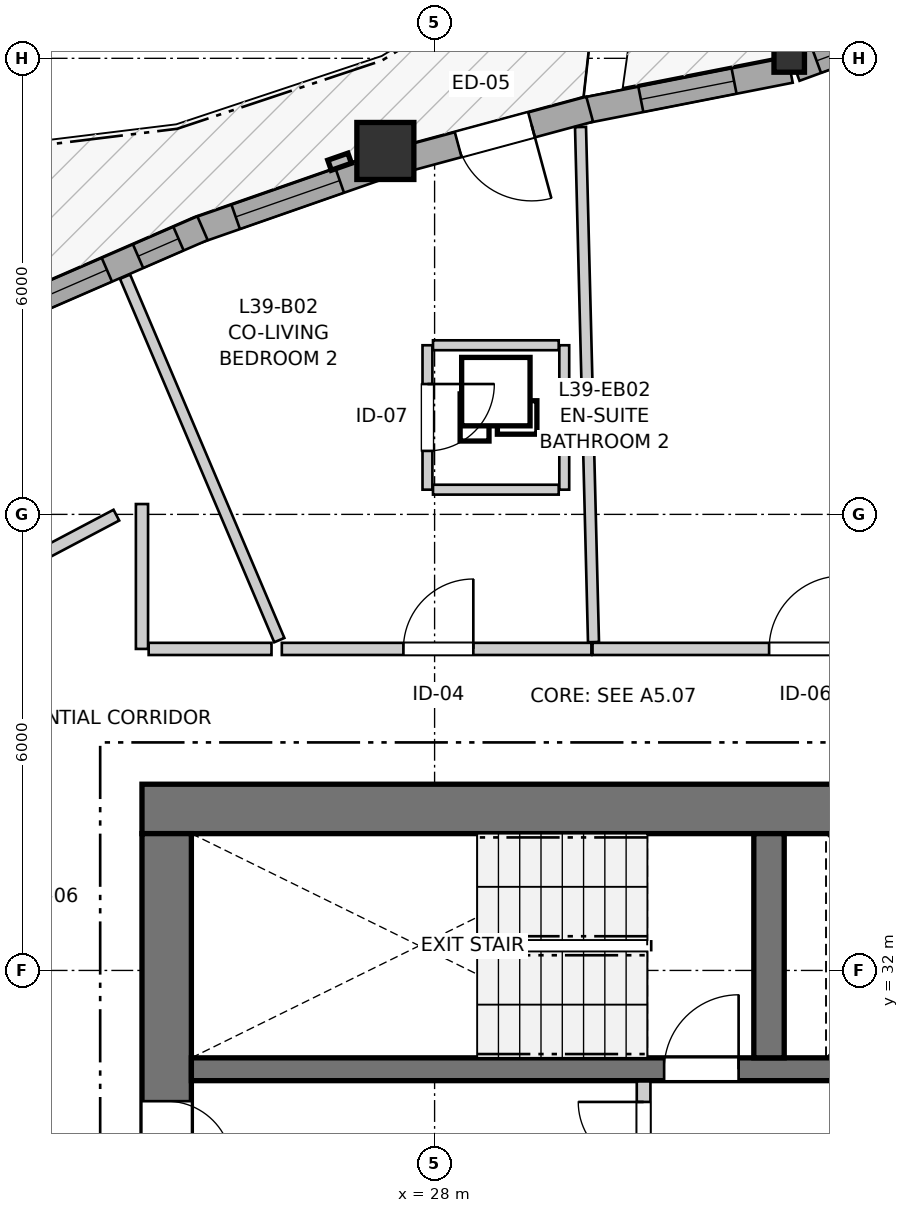
"""IFC4 building model, lengths in metres.
Left out: names, types, materials, properties, quantities, classifications, styles, units other than length and angle.
Written with IfcOpenShell. Run it as: python <this file> out.ifc"""

import sys

from ifc_helpers import new_model, si_unit, direction, frame, frame_2d, origin, origin_2d, place, context, subcontext, project, spatial, rectangle, i_section, extrude, source, transform, mapped, element, fill, save


model = new_model("IFC4")
c1 = context("Model", 3, precision=1e-05, world=origin(), true_north=direction((0.0, 1.0)))
c2 = subcontext(c1, "Body", "Model", "MODEL_VIEW")
j1 = project(units=[si_unit("LENGTHUNIT", "METRE"), si_unit("PLANEANGLEUNIT", "RADIAN")], contexts=[c1])
p1 = place(None, origin())
s1 = spatial("IfcSite", under=j1, at=p1, CompositionType="ELEMENT")
p2 = place(p1, origin())
s2 = spatial("IfcBuilding", under=s1, at=p2, CompositionType="ELEMENT")
p3 = place(p2, frame((0.0, 0.0, 133.0)))
s3 = spatial("IfcBuildingStorey", under=s2, at=p3, CompositionType="ELEMENT", Elevation=133.0)
p4 = place(p3, frame((36.55, 34.125, 0.0), z_axis=(0.0, 0.0, 1.0), x_axis=(-1.0, 0.0, 0.0)))
e1 = element("IfcWall", 1, at=p4, inside=s3, PredefinedType="SHEAR", context=c2, shape_type="SweptSolid", body=[
    extrude(rectangle(XDim=12.4, YDim=0.65, at=frame_2d((6.2, 0.0))), origin(), (0.0, 0.0, 1.0), 2.95),
])
p5 = place(p3, frame((24.475, 33.8, 0.0), z_axis=(0.0, 0.0, 1.0), x_axis=(0.0, -1.0, 0.0)))
e2 = element("IfcWall", 2, at=p5, inside=s3, PredefinedType="SHEAR", context=c2, shape_type="SweptSolid", body=[
    extrude(rectangle(XDim=15.6, YDim=0.65, at=frame_2d((7.8, 0.0))), origin(), (0.0, 0.0, 1.0), 2.95),
])
p6 = place(p5, frame((7.05, 0.0, 0.0)))
e3 = element("IfcOpeningElement", 3, at=p6, cuts=e2, PredefinedType="OPENING", context=c2, shape_type="SweptSolid", body=[
    extrude(rectangle(XDim=1.5, YDim=2.15, at=frame_2d((0.75, 1.075))), frame((0.0, 0.335, 0.0), z_axis=(0.0, -1.0, 0.0), x_axis=(1.0, 0.0, 0.0)), (0.0, 0.0, 1.0), 0.67),
])
p7 = place(p5, frame((3.52, 0.0, 0.0)))
e4 = element("IfcOpeningElement", 4, at=p7, cuts=e2, PredefinedType="OPENING", context=c2, shape_type="SweptSolid", body=[
    extrude(rectangle(XDim=0.86, YDim=2.05, at=frame_2d((0.43, 1.025))), frame((0.0, 0.335, 0.0), z_axis=(0.0, -1.0, 0.0), x_axis=(1.0, 0.0, 0.0)), (0.0, 0.0, 1.0), 0.67),
])
p8 = place(p5, frame((11.22, 0.0, 0.0)))
e5 = element("IfcOpeningElement", 5, at=p8, cuts=e2, PredefinedType="OPENING", context=c2, shape_type="SweptSolid", body=[
    extrude(rectangle(XDim=0.86, YDim=2.05, at=frame_2d((0.43, 1.025))), frame((0.0, 0.335, 0.0), z_axis=(0.0, -1.0, 0.0), x_axis=(1.0, 0.0, 0.0)), (0.0, 0.0, 1.0), 0.67),
])
p9 = place(p3, frame((24.8, 30.7, 0.0), z_axis=(0.0, 0.0, 1.0), x_axis=(1.0, 0.0, 0.0)))
e6 = element("IfcWall", 6, at=p9, inside=s3, PredefinedType="SHEAR", context=c2, shape_type="SweptSolid", body=[
    extrude(rectangle(XDim=11.1, YDim=0.3, at=frame_2d((5.55, 0.0))), origin(), (0.0, 0.0, 1.0), 2.95),
])
p10 = place(p9, frame((6.22, 0.0, 0.0)))
e7 = element("IfcOpeningElement", 7, at=p10, cuts=e6, PredefinedType="OPENING", context=c2, shape_type="SweptSolid", body=[
    extrude(rectangle(XDim=0.98, YDim=2.15, at=frame_2d((0.49, 1.075))), frame((0.0, 0.16, 0.0), z_axis=(0.0, -1.0, 0.0), x_axis=(1.0, 0.0, 0.0)), (0.0, 0.0, 1.0), 0.32),
])
p11 = place(p9, frame((9.15, 0.0, 0.0)))
e8 = element("IfcOpeningElement", 8, at=p11, cuts=e6, PredefinedType="OPENING", context=c2, shape_type="SweptSolid", body=[
    extrude(rectangle(XDim=1.15, YDim=2.15, at=frame_2d((0.575, 1.075))), frame((0.0, 0.16, 0.0), z_axis=(0.0, -1.0, 0.0), x_axis=(1.0, 0.0, 0.0)), (0.0, 0.0, 1.0), 0.32),
])
p12 = place(p3, frame((32.4, 30.85, 0.0), z_axis=(0.0, 0.0, 1.0), x_axis=(0.0, 1.0, 0.0)))
e9 = element("IfcWall", 9, at=p12, inside=s3, PredefinedType="SHEAR", context=c2, shape_type="SweptSolid", body=[
    extrude(rectangle(XDim=2.95, YDim=0.4, at=frame_2d((1.475, 0.0))), origin(), (0.0, 0.0, 1.0), 2.95),
])
m1 = source(origin(), c2, "Body", "SweptSolid", [
    extrude(i_section(OverallWidth=0.401, OverallDepth=0.399, WebThickness=0.023, FlangeThickness=0.036, FilletRadius=0.015, at=origin_2d()), origin(), (0.0, 0.0, 1.0), 2.95),
])
p13 = place(p3, frame((32.666, 44.017, 0.0), z_axis=(0.0, 0.0, 1.0), x_axis=(1.0, 0.0, 0.0)))
e10 = element("IfcColumn", 10, at=p13, inside=s3, PredefinedType="PILASTER", context=c2, shape_type="MappedRepresentation", body=[
    mapped(m1, transform((0.0, 0.0, 0.0), x_axis=(1.0, 0.0, 0.0), y_axis=(0.0, 1.0, 0.0), z_axis=(0.0, 0.0, 1.0), scale=1.0)),
])
m2 = source(origin(), c2, "Body", "SweptSolid", [
    extrude(rectangle(XDim=0.75, YDim=0.75, at=origin_2d()), origin(), (0.0, 0.0, 1.0), 2.95),
])
p14 = place(p3, frame((27.352, 42.781, 0.0), z_axis=(0.0, 0.0, 1.0), x_axis=(1.0, 0.0, 0.0)))
e11 = element("IfcColumn", 11, at=p14, inside=s3, PredefinedType="COLUMN", context=c2, shape_type="MappedRepresentation", body=[
    mapped(m2, transform((0.0, 0.0, 0.0), x_axis=(1.0, 0.0, 0.0), y_axis=(0.0, 1.0, 0.0), z_axis=(0.0, 0.0, 1.0), scale=1.0)),
])
p15 = place(p3, frame((34.644, 44.557, 0.0), z_axis=(0.0, 0.0, 1.0), x_axis=(-0.939440593615, -0.342711790092, 0.0)))
e12 = element("IfcWall", 12, at=p15, inside=s3, PredefinedType="SOLIDWALL", context=c2, shape_type="SweptSolid", body=[
    extrude(rectangle(XDim=2.023, YDim=0.34, at=frame_2d((1.012, 0.0))), origin(), (0.0, 0.0, 1.0), 2.53),
])
p16 = place(p15, frame((0.322, 0.0, 0.82)))
e13 = element("IfcOpeningElement", 13, at=p16, cuts=e12, PredefinedType="OPENING", context=c2, shape_type="SweptSolid", body=[
    extrude(rectangle(XDim=1.4, YDim=1.35, at=frame_2d((0.7, 0.675))), frame((0.0, 0.18, 0.0), z_axis=(0.0, -1.0, 0.0), x_axis=(1.0, 0.0, 0.0)), (0.0, 0.0, 1.0), 0.36),
])
p17 = place(p3, frame((32.679, 43.846, 0.0), z_axis=(0.0, 0.0, 1.0), x_axis=(-0.981247929568, -0.192749839736, 0.0)))
e14 = element("IfcWall", 14, at=p17, inside=s3, PredefinedType="SOLIDWALL", context=c2, shape_type="SweptSolid", body=[
    extrude(rectangle(XDim=2.776, YDim=0.34, at=frame_2d((1.388, 0.0))), origin(), (0.0, 0.0, 1.0), 2.53),
])
p18 = place(p17, frame((0.753, 0.0, 0.82)))
e15 = element("IfcOpeningElement", 15, at=p18, cuts=e14, PredefinedType="OPENING", context=c2, shape_type="SweptSolid", body=[
    extrude(rectangle(XDim=1.25, YDim=1.35, at=frame_2d((0.625, 0.675))), frame((0.0, 0.18, 0.0), z_axis=(0.0, -1.0, 0.0), x_axis=(1.0, 0.0, 0.0)), (0.0, 0.0, 1.0), 0.36),
])
p19 = place(p3, frame((30.04, 43.331, 0.0), z_axis=(0.0, 0.0, 1.0), x_axis=(-0.965460468502, -0.260549580233, 0.0)))
e16 = element("IfcWall", 16, at=p19, inside=s3, PredefinedType="SOLIDWALL", context=c2, shape_type="SweptSolid", body=[
    extrude(rectangle(XDim=2.583, YDim=0.34, at=frame_2d((1.292, 0.0))), origin(), (0.0, 0.0, 1.0), 2.53),
])
p20 = place(p19, frame((0.792, 0.0, 0.0)))
e17 = element("IfcOpeningElement", 17, at=p20, cuts=e16, PredefinedType="OPENING", context=c2, shape_type="SweptSolid", body=[
    extrude(rectangle(XDim=1.0, YDim=2.1, at=frame_2d((0.5, 1.05))), frame((0.0, 0.18, 0.0), z_axis=(0.0, -1.0, 0.0), x_axis=(1.0, 0.0, 0.0)), (0.0, 0.0, 1.0), 0.36),
])
p21 = place(p3, frame((27.262, 42.57, 0.0), z_axis=(0.0, 0.0, 1.0), x_axis=(-0.944148723561, -0.329519631884, 0.0)))
e18 = element("IfcWall", 18, at=p21, inside=s3, PredefinedType="SOLIDWALL", context=c2, shape_type="SweptSolid", body=[
    extrude(rectangle(XDim=2.54, YDim=0.34, at=frame_2d((1.27, 0.0))), origin(), (0.0, 0.0, 1.0), 2.53),
])
p22 = place(p21, frame((0.54, 0.0, 0.82)))
e19 = element("IfcOpeningElement", 19, at=p22, cuts=e18, PredefinedType="OPENING", context=c2, shape_type="SweptSolid", body=[
    extrude(rectangle(XDim=1.45, YDim=1.25, at=frame_2d((0.725, 0.625))), frame((0.0, 0.18, 0.0), z_axis=(0.0, -1.0, 0.0), x_axis=(1.0, 0.0, 0.0)), (0.0, 0.0, 1.0), 0.36),
])
p23 = place(p3, frame((24.947, 41.765, 0.0), z_axis=(0.0, 0.0, 1.0), x_axis=(-0.917074459221, -0.398715984435, 0.0)))
e20 = element("IfcWall", 20, at=p23, inside=s3, PredefinedType="SOLIDWALL", context=c2, shape_type="SweptSolid", body=[
    extrude(rectangle(XDim=2.645, YDim=0.34, at=frame_2d((1.322, 0.0))), origin(), (0.0, 0.0, 1.0), 2.53),
])
p24 = place(p23, frame((0.344, 0.0, 0.82)))
e21 = element("IfcOpeningElement", 21, at=p24, cuts=e20, PredefinedType="OPENING", context=c2, shape_type="SweptSolid", body=[
    extrude(rectangle(XDim=0.58, YDim=1.35, at=frame_2d((0.29, 0.675))), frame((0.0, 0.18, 0.0), z_axis=(0.0, -1.0, 0.0), x_axis=(1.0, 0.0, 0.0)), (0.0, 0.0, 1.0), 0.36),
])
p25 = place(p23, frame((1.372, 0.0, 0.82)))
e22 = element("IfcOpeningElement", 22, at=p25, cuts=e20, PredefinedType="OPENING", context=c2, shape_type="SweptSolid", body=[
    extrude(rectangle(XDim=0.95, YDim=1.35, at=frame_2d((0.475, 0.675))), frame((0.0, 0.18, 0.0), z_axis=(0.0, -1.0, 0.0), x_axis=(1.0, 0.0, 0.0)), (0.0, 0.0, 1.0), 0.36),
])
p26 = place(p3, frame((30.75, 27.43, 0.0), z_axis=(0.0, 0.0, 1.0), x_axis=(0.0, 1.0, 0.0)))
e23 = element("IfcWall", 23, at=p26, inside=s3, PredefinedType="PARTITIONING", context=c2, shape_type="SweptSolid", body=[
    extrude(rectangle(XDim=3.11, YDim=0.18, at=frame_2d((1.555, 0.0))), origin(), (0.0, 0.0, 1.0), 2.95),
])
p27 = place(p26, frame((1.98, 0.0, 0.0)))
e24 = element("IfcOpeningElement", 24, at=p27, cuts=e23, PredefinedType="OPENING", context=c2, shape_type="SweptSolid", body=[
    extrude(rectangle(XDim=0.86, YDim=2.05, at=frame_2d((0.43, 1.025))), frame((0.0, 0.1, 0.0), z_axis=(0.0, -1.0, 0.0), x_axis=(1.0, 0.0, 0.0)), (0.0, 0.0, 1.0), 0.2),
])
p28 = place(p3, frame((30.078, 36.23, 0.0), z_axis=(0.0, 0.0, 1.0), x_axis=(1.0, 0.0, 0.0)))
e25 = element("IfcWall", 25, at=p28, inside=s3, PredefinedType="PARTITIONING", context=c2, shape_type="SweptSolid", body=[
    extrude(rectangle(XDim=5.608, YDim=0.16, at=frame_2d((2.804, 0.0))), origin(), (0.0, 0.0, 1.0), 2.588),
])
p29 = place(p28, frame((2.323, 0.0, 0.0)))
e26 = element("IfcOpeningElement", 26, at=p29, cuts=e25, PredefinedType="OPENING", context=c2, shape_type="SweptSolid", body=[
    extrude(rectangle(XDim=0.96, YDim=2.1, at=frame_2d((0.48, 1.05))), frame((0.0, 0.09, 0.0), z_axis=(0.0, -1.0, 0.0), x_axis=(1.0, 0.0, 0.0)), (0.0, 0.0, 1.0), 0.18),
])
p30 = place(p3, frame((25.99, 36.23, 0.0), z_axis=(0.0, 0.0, 1.0), x_axis=(1.0, 0.0, 0.0)))
e27 = element("IfcWall", 27, at=p30, inside=s3, PredefinedType="PARTITIONING", context=c2, shape_type="SweptSolid", body=[
    extrude(rectangle(XDim=4.073, YDim=0.16, at=frame_2d((2.037, 0.0))), origin(), (0.0, 0.0, 1.0), 2.95),
])
p31 = place(p30, frame((1.6, 0.0, 0.0)))
e28 = element("IfcOpeningElement", 28, at=p31, cuts=e27, PredefinedType="OPENING", context=c2, shape_type="SweptSolid", body=[
    extrude(rectangle(XDim=0.92, YDim=2.1, at=frame_2d((0.46, 1.05))), frame((0.0, 0.09, 0.0), z_axis=(0.0, -1.0, 0.0), x_axis=(1.0, 0.0, 0.0)), (0.0, 0.0, 1.0), 0.18),
])
p32 = place(p3, frame((27.906, 40.225, 0.0), z_axis=(0.0, 0.0, 1.0), x_axis=(0.0, -1.0, 0.0)))
e29 = element("IfcWall", 29, at=p32, inside=s3, PredefinedType="PARTITIONING", context=c2, shape_type="SweptSolid", body=[
    extrude(rectangle(XDim=1.9, YDim=0.13, at=frame_2d((0.95, 0.0))), origin(), (0.0, 0.0, 1.0), 2.318),
])
p33 = place(p32, frame((0.51, 0.0, 0.0)))
e30 = element("IfcOpeningElement", 30, at=p33, cuts=e29, PredefinedType="OPENING", context=c2, shape_type="SweptSolid", body=[
    extrude(rectangle(XDim=0.88, YDim=2.05, at=frame_2d((0.44, 1.025))), frame((0.0, 0.075, 0.0), z_axis=(0.0, -1.0, 0.0), x_axis=(1.0, 0.0, 0.0)), (0.0, 0.0, 1.0), 0.15),
])
p34 = place(p3, frame((29.92, 43.096, 0.0), z_axis=(0.0, 0.0, 1.0), x_axis=(0.025211755772, -0.999682133166, 0.0)))
e31 = element("IfcWall", 31, at=p34, inside=s3, PredefinedType="PARTITIONING", context=c2, shape_type="SweptSolid", body=[
    extrude(rectangle(XDim=6.779, YDim=0.145, at=frame_2d((3.389, 0.0))), origin(), (0.0, 0.0, 1.0), 2.95),
])
p35 = place(p3, frame((23.927, 41.127, 0.0), z_axis=(0.0, 0.0, 1.0), x_axis=(0.39073452171, -0.920503413108, 0.0)))
e32 = element("IfcWall", 32, at=p35, inside=s3, PredefinedType="PARTITIONING", context=c2, shape_type="SweptSolid", body=[
    extrude(rectangle(XDim=5.194, YDim=0.145, at=frame_2d((2.597, 0.0))), origin(), (0.0, 0.0, 1.0), 2.95),
])
p36 = place(p3, frame((24.15, 36.23, 0.0), z_axis=(0.0, 0.0, 1.0), x_axis=(0.0, 1.0, 0.0)))
e33 = element("IfcWall", 33, at=p36, inside=s3, PredefinedType="PARTITIONING", context=c2, shape_type="SweptSolid", body=[
    extrude(rectangle(XDim=1.906, YDim=0.16, at=frame_2d((0.953, 0.0))), origin(), (0.0, 0.0, 1.0), 2.95),
])
p37 = place(p3, frame((29.706, 38.325, 0.0), z_axis=(0.0, 0.0, 1.0), x_axis=(0.0, 1.0, 0.0)))
e34 = element("IfcWall", 34, at=p37, inside=s3, PredefinedType="PARTITIONING", context=c2, shape_type="SweptSolid", body=[
    extrude(rectangle(XDim=1.9, YDim=0.13, at=frame_2d((0.95, 0.0))), origin(), (0.0, 0.0, 1.0), 2.95),
])
p38 = place(p3, frame((24.238, 36.23, 0.0), z_axis=(0.0, 0.0, 1.0), x_axis=(1.0, 0.0, 0.0)))
e35 = element("IfcWall", 35, at=p38, inside=s3, PredefinedType="PARTITIONING", context=c2, shape_type="SweptSolid", body=[
    extrude(rectangle(XDim=1.616, YDim=0.16, at=frame_2d((0.808, 0.0))), origin(), (0.0, 0.0, 1.0), 2.95),
])
p39 = place(p3, frame((27.979, 40.225, 0.0), z_axis=(0.0, 0.0, 1.0), x_axis=(1.0, 0.0, 0.0)))
e36 = element("IfcWall", 36, at=p39, inside=s3, PredefinedType="PARTITIONING", context=c2, shape_type="SweptSolid", body=[
    extrude(rectangle(XDim=1.654, YDim=0.13, at=frame_2d((0.827, 0.0))), origin(), (0.0, 0.0, 1.0), 2.558),
])
p40 = place(p3, frame((27.979, 38.325, 0.0), z_axis=(0.0, 0.0, 1.0), x_axis=(1.0, 0.0, 0.0)))
e37 = element("IfcWall", 37, at=p40, inside=s3, PredefinedType="PARTITIONING", context=c2, shape_type="SweptSolid", body=[
    extrude(rectangle(XDim=1.654, YDim=0.13, at=frame_2d((0.827, 0.0))), origin(), (0.0, 0.0, 1.0), 2.95),
])
p41 = place(p3, frame((22.37, 37.228, 0.0), z_axis=(0.0, 0.0, 1.0), x_axis=(0.884271493782, 0.466973152638, 0.0)))
e38 = element("IfcWall", 38, at=p41, inside=s3, PredefinedType="PARTITIONING", context=c2, shape_type="SweptSolid", body=[
    extrude(rectangle(XDim=1.632, YDim=0.16, at=frame_2d((0.816, 0.0))), origin(), (0.0, 0.0, 1.0), 2.558),
])
m3 = source(origin(), c2, "Body", "SweptSolid", [
    extrude(rectangle(XDim=1.4, YDim=1.35, at=frame_2d((0.7, 0.675))), frame((0.0, 0.03, 0.0), z_axis=(0.0, -1.0, 0.0), x_axis=(1.0, 0.0, 0.0)), (0.0, 0.0, 1.0), 0.06),
])
p42 = place(p16, origin())
e39 = element("IfcWindow", 39, at=p42, inside=s3, PartitioningType="SINGLE_PANEL", PredefinedType="WINDOW", context=c2, shape_type="MappedRepresentation", body=[
    mapped(m3, transform((0.0, 0.0, 0.0), x_axis=(1.0, 0.0, 0.0), y_axis=(0.0, 1.0, 0.0), z_axis=(0.0, 0.0, 1.0), scale=1.0)),
])
fill(e13, e39)
m4 = source(origin(), c2, "Body", "SweptSolid", [
    extrude(rectangle(XDim=1.25, YDim=1.35, at=frame_2d((0.625, 0.675))), frame((0.0, 0.03, 0.0), z_axis=(0.0, -1.0, 0.0), x_axis=(1.0, 0.0, 0.0)), (0.0, 0.0, 1.0), 0.06),
])
p43 = place(p18, origin())
e40 = element("IfcWindow", 40, at=p43, inside=s3, PartitioningType="SINGLE_PANEL", PredefinedType="WINDOW", context=c2, shape_type="MappedRepresentation", body=[
    mapped(m4, transform((0.0, 0.0, 0.0), x_axis=(1.0, 0.0, 0.0), y_axis=(0.0, 1.0, 0.0), z_axis=(0.0, 0.0, 1.0), scale=1.0)),
])
fill(e15, e40)
m5 = source(origin(), c2, "Body", "SweptSolid", [
    extrude(rectangle(XDim=1.45, YDim=1.25, at=frame_2d((0.725, 0.625))), frame((0.0, 0.03, 0.0), z_axis=(0.0, -1.0, 0.0), x_axis=(1.0, 0.0, 0.0)), (0.0, 0.0, 1.0), 0.06),
])
p44 = place(p22, origin())
e41 = element("IfcWindow", 41, at=p44, inside=s3, PartitioningType="SINGLE_PANEL", PredefinedType="WINDOW", context=c2, shape_type="MappedRepresentation", body=[
    mapped(m5, transform((0.0, 0.0, 0.0), x_axis=(1.0, 0.0, 0.0), y_axis=(0.0, 1.0, 0.0), z_axis=(0.0, 0.0, 1.0), scale=1.0)),
])
fill(e19, e41)
m6 = source(origin(), c2, "Body", "SweptSolid", [
    extrude(rectangle(XDim=0.58, YDim=1.35, at=frame_2d((0.29, 0.675))), frame((0.0, 0.03, 0.0), z_axis=(0.0, -1.0, 0.0), x_axis=(1.0, 0.0, 0.0)), (0.0, 0.0, 1.0), 0.06),
])
p45 = place(p24, origin())
e42 = element("IfcWindow", 42, at=p45, inside=s3, PartitioningType="SINGLE_PANEL", PredefinedType="WINDOW", context=c2, shape_type="MappedRepresentation", body=[
    mapped(m6, transform((0.0, 0.0, 0.0), x_axis=(1.0, 0.0, 0.0), y_axis=(0.0, 1.0, 0.0), z_axis=(0.0, 0.0, 1.0), scale=1.0)),
])
fill(e21, e42)
m7 = source(origin(), c2, "Body", "SweptSolid", [
    extrude(rectangle(XDim=0.95, YDim=1.35, at=frame_2d((0.475, 0.675))), frame((0.0, 0.03, 0.0), z_axis=(0.0, -1.0, 0.0), x_axis=(1.0, 0.0, 0.0)), (0.0, 0.0, 1.0), 0.06),
])
p46 = place(p25, origin())
e43 = element("IfcWindow", 43, at=p46, inside=s3, PartitioningType="SINGLE_PANEL", PredefinedType="WINDOW", context=c2, shape_type="MappedRepresentation", body=[
    mapped(m7, transform((0.0, 0.0, 0.0), x_axis=(1.0, 0.0, 0.0), y_axis=(0.0, 1.0, 0.0), z_axis=(0.0, 0.0, 1.0), scale=1.0)),
])
fill(e22, e43)
m8 = source(origin(), c2, "Body", "SweptSolid", [
    extrude(rectangle(XDim=1.0, YDim=2.1, at=frame_2d((0.5, 1.05))), frame((0.0, 0.025, 0.0), z_axis=(0.0, -1.0, 0.0), x_axis=(1.0, 0.0, 0.0)), (0.0, 0.0, 1.0), 0.05),
])
p47 = place(p20, origin())
e44 = element("IfcDoor", 44, at=p47, inside=s3, OperationType="SINGLE_SWING_LEFT", PredefinedType="DOOR", context=c2, shape_type="MappedRepresentation", body=[
    mapped(m8, transform((0.0, 0.0, 0.0), x_axis=(1.0, 0.0, 0.0), y_axis=(0.0, 1.0, 0.0), z_axis=(0.0, 0.0, 1.0), scale=1.0)),
])
fill(e17, e44)
m9 = source(origin(), c2, "Body", "SweptSolid", [
    extrude(rectangle(XDim=0.98, YDim=2.15, at=frame_2d((0.49, 1.075))), frame((0.0, 0.025, 0.0), z_axis=(0.0, -1.0, 0.0), x_axis=(1.0, 0.0, 0.0)), (0.0, 0.0, 1.0), 0.05),
])
p48 = place(p10, origin())
e45 = element("IfcDoor", 45, at=p48, inside=s3, OperationType="SINGLE_SWING_RIGHT", PredefinedType="DOOR", context=c2, shape_type="MappedRepresentation", body=[
    mapped(m9, transform((0.0, 0.0, 0.0), x_axis=(1.0, 0.0, 0.0), y_axis=(0.0, 1.0, 0.0), z_axis=(0.0, 0.0, 1.0), scale=1.0)),
])
fill(e7, e45)
m10 = source(origin(), c2, "Body", "SweptSolid", [
    extrude(rectangle(XDim=0.86, YDim=2.05, at=frame_2d((0.43, 1.025))), frame((0.0, 0.025, 0.0), z_axis=(0.0, -1.0, 0.0), x_axis=(1.0, 0.0, 0.0)), (0.0, 0.0, 1.0), 0.05),
])
p49 = place(p7, origin())
e46 = element("IfcDoor", 46, at=p49, inside=s3, OperationType="SINGLE_SWING_RIGHT", PredefinedType="DOOR", context=c2, shape_type="MappedRepresentation", body=[
    mapped(m10, transform((0.0, 0.0, 0.0), x_axis=(1.0, 0.0, 0.0), y_axis=(0.0, 1.0, 0.0), z_axis=(0.0, 0.0, 1.0), scale=1.0)),
])
fill(e4, e46)
p50 = place(p27, origin())
e47 = element("IfcDoor", 47, at=p50, inside=s3, OperationType="SINGLE_SWING_RIGHT", PredefinedType="DOOR", context=c2, shape_type="MappedRepresentation", body=[
    mapped(m10, transform((0.0, 0.0, 0.0), x_axis=(1.0, 0.0, 0.0), y_axis=(0.0, 1.0, 0.0), z_axis=(0.0, 0.0, 1.0), scale=1.0)),
])
fill(e24, e47)
m11 = source(origin(), c2, "Body", "SweptSolid", [
    extrude(rectangle(XDim=0.96, YDim=2.1, at=frame_2d((0.48, 1.05))), frame((0.0, 0.025, 0.0), z_axis=(0.0, -1.0, 0.0), x_axis=(1.0, 0.0, 0.0)), (0.0, 0.0, 1.0), 0.05),
])
p51 = place(p29, origin())
e48 = element("IfcDoor", 48, at=p51, inside=s3, OperationType="SINGLE_SWING_RIGHT", PredefinedType="DOOR", context=c2, shape_type="MappedRepresentation", body=[
    mapped(m11, transform((0.0, 0.0, 0.0), x_axis=(1.0, 0.0, 0.0), y_axis=(0.0, 1.0, 0.0), z_axis=(0.0, 0.0, 1.0), scale=1.0)),
])
fill(e26, e48)
m12 = source(origin(), c2, "Body", "SweptSolid", [
    extrude(rectangle(XDim=0.92, YDim=2.1, at=frame_2d((0.46, 1.05))), frame((0.0, 0.025, 0.0), z_axis=(0.0, -1.0, 0.0), x_axis=(1.0, 0.0, 0.0)), (0.0, 0.0, 1.0), 0.05),
])
p52 = place(p31, origin())
e49 = element("IfcDoor", 49, at=p52, inside=s3, OperationType="SINGLE_SWING_RIGHT", PredefinedType="DOOR", context=c2, shape_type="MappedRepresentation", body=[
    mapped(m12, transform((0.0, 0.0, 0.0), x_axis=(1.0, 0.0, 0.0), y_axis=(0.0, 1.0, 0.0), z_axis=(0.0, 0.0, 1.0), scale=1.0)),
])
fill(e28, e49)
m13 = source(origin(), c2, "Body", "SweptSolid", [
    extrude(rectangle(XDim=0.88, YDim=2.05, at=frame_2d((0.44, 1.025))), frame((0.0, 0.025, 0.0), z_axis=(0.0, -1.0, 0.0), x_axis=(1.0, 0.0, 0.0)), (0.0, 0.0, 1.0), 0.05),
])
p53 = place(p33, origin())
e50 = element("IfcDoor", 50, at=p53, inside=s3, OperationType="SINGLE_SWING_LEFT", PredefinedType="DOOR", context=c2, shape_type="MappedRepresentation", body=[
    mapped(m13, transform((0.0, 0.0, 0.0), x_axis=(1.0, 0.0, 0.0), y_axis=(0.0, 1.0, 0.0), z_axis=(0.0, 0.0, 1.0), scale=1.0)),
])
fill(e30, e50)
save(model, sys.argv[1])
